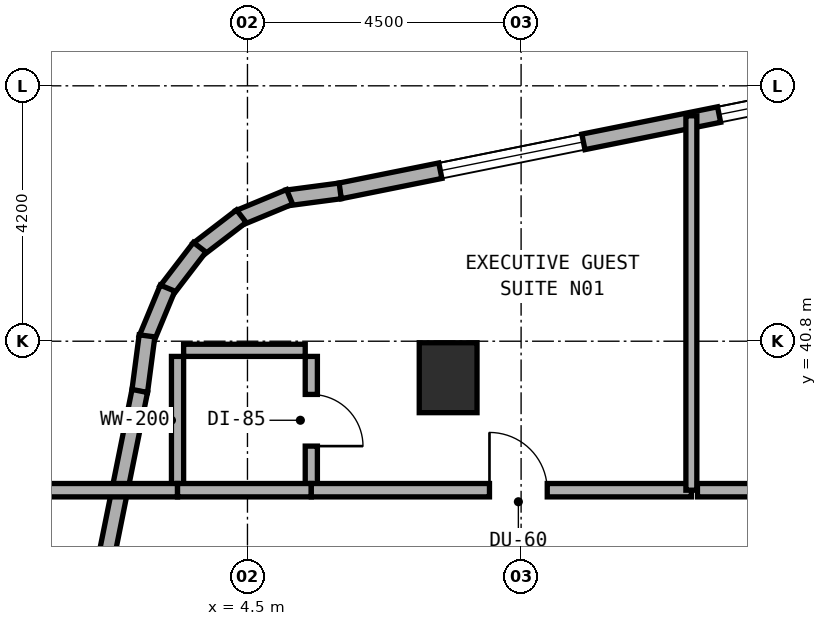
"""IFC4 building model, lengths in metres.
Left out: names, types, materials, properties, quantities, classifications, styles, units other than length and angle.
Written with IfcOpenShell. Run it as: python <this file> out.ifc"""

import sys

from ifc_helpers import new_model, si_unit, direction, frame, frame_2d, origin, origin_2d, place, context, subcontext, project, spatial, rectangle, extrude, element, fill, save


model = new_model("IFC4")
c1 = context("Model", 3, precision=1e-05, world=origin(), true_north=direction((0.0, 1.0)))
c2 = subcontext(c1, "Body", "Model", "MODEL_VIEW")
j1 = project(units=[si_unit("LENGTHUNIT", "METRE"), si_unit("PLANEANGLEUNIT", "RADIAN")], contexts=[c1])
p1 = place(None, origin())
s1 = spatial("IfcSite", under=j1, at=p1, CompositionType="ELEMENT")
p2 = place(p1, origin())
s2 = spatial("IfcBuilding", under=s1, at=p2, CompositionType="ELEMENT")
p3 = place(p2, frame((0.0, 0.0, 112.5)))
s3 = spatial("IfcBuildingStorey", under=s2, at=p3, CompositionType="ELEMENT", Elevation=112.5)
p4 = place(p3, frame((7.8, 40.2, 0.0), z_axis=(0.0, 0.0, 1.0), x_axis=(1.0, 0.0, 0.0)))
e1 = element("IfcColumn", 1, at=p4, inside=s3, PredefinedType="COLUMN", context=c2, shape_type="SweptSolid", body=[
    extrude(rectangle(XDim=0.95, YDim=1.15, at=origin_2d()), origin(), (0.0, 0.0, 1.0), 3.5),
])
p5 = place(p3, frame((14.991, 45.078, 0.0), z_axis=(0.0, 0.0, 1.0), x_axis=(-0.980321298532, -0.197408590603, 0.0)))
e2 = element("IfcWall", 2, at=p5, inside=s3, PredefinedType="STANDARD", context=c2, shape_type="SweptSolid", body=[
    extrude(rectangle(XDim=9.153, YDim=0.26, at=frame_2d((4.577, 0.0))), origin(), (0.0, 0.0, 1.0), 3.22),
])
p6 = place(p5, frame((0.39, 0.0, 0.8)))
e3 = element("IfcOpeningElement", 3, at=p6, cuts=e2, PredefinedType="OPENING", context=c2, shape_type="SweptSolid", body=[
    extrude(rectangle(XDim=2.4, YDim=1.6, at=frame_2d((1.2, 0.8))), frame((0.0, 0.14, 0.0), z_axis=(0.0, -1.0, 0.0), x_axis=(1.0, 0.0, 0.0)), (0.0, 0.0, 1.0), 0.28),
])
p7 = place(p5, frame((5.066, 0.0, 0.8)))
e4 = element("IfcOpeningElement", 4, at=p7, cuts=e2, PredefinedType="OPENING", context=c2, shape_type="SweptSolid", body=[
    extrude(rectangle(XDim=2.4, YDim=1.6, at=frame_2d((1.2, 0.8))), frame((0.0, 0.14, 0.0), z_axis=(0.0, -1.0, 0.0), x_axis=(1.0, 0.0, 0.0)), (0.0, 0.0, 1.0), 0.28),
])
p8 = place(p3, frame((6.025, 43.272, 0.0), z_axis=(0.0, 0.0, 1.0), x_axis=(-0.991388484223, -0.130953706898, 0.0)))
e5 = element("IfcWall", 5, at=p8, inside=s3, PredefinedType="STANDARD", context=c2, shape_type="SweptSolid", body=[
    extrude(rectangle(XDim=0.885, YDim=0.26, at=frame_2d((0.443, 0.0))), origin(), (0.0, 0.0, 1.0), 3.22),
])
p9 = place(p3, frame((5.193, 43.174, 0.0), z_axis=(0.0, 0.0, 1.0), x_axis=(-0.923627776508, -0.383290660547, 0.0)))
e6 = element("IfcWall", 6, at=p9, inside=s3, PredefinedType="STANDARD", context=c2, shape_type="SweptSolid", body=[
    extrude(rectangle(XDim=0.903, YDim=0.26, at=frame_2d((0.452, 0.0))), origin(), (0.0, 0.0, 1.0), 3.22),
])
p10 = place(p3, frame((4.399, 42.856, 0.0), z_axis=(0.0, 0.0, 1.0), x_axis=(-0.793458244748, -0.608624690463, 0.0)))
e7 = element("IfcWall", 7, at=p10, inside=s3, PredefinedType="STANDARD", context=c2, shape_type="SweptSolid", body=[
    extrude(rectangle(XDim=0.902, YDim=0.26, at=frame_2d((0.451, 0.0))), origin(), (0.0, 0.0, 1.0), 3.22),
])
p11 = place(p3, frame((3.714, 42.345, 0.0), z_axis=(0.0, 0.0, 1.0), x_axis=(-0.608494022858, -0.793558456666, 0.0)))
e8 = element("IfcWall", 8, at=p11, inside=s3, PredefinedType="STANDARD", context=c2, shape_type="SweptSolid", body=[
    extrude(rectangle(XDim=0.902, YDim=0.26, at=frame_2d((0.451, 0.0))), origin(), (0.0, 0.0, 1.0), 3.22),
])
p12 = place(p3, frame((3.186, 41.673, 0.0), z_axis=(0.0, 0.0, 1.0), x_axis=(-0.383155708213, -0.923683767999, 0.0)))
e9 = element("IfcWall", 9, at=p12, inside=s3, PredefinedType="STANDARD", context=c2, shape_type="SweptSolid", body=[
    extrude(rectangle(XDim=0.903, YDim=0.26, at=frame_2d((0.451, 0.0))), origin(), (0.0, 0.0, 1.0), 3.22),
])
p13 = place(p3, frame((2.848, 40.888, 0.0), z_axis=(0.0, 0.0, 1.0), x_axis=(-0.130200706103, -0.991487658083, 0.0)))
e10 = element("IfcWall", 10, at=p13, inside=s3, PredefinedType="STANDARD", context=c2, shape_type="SweptSolid", body=[
    extrude(rectangle(XDim=0.921, YDim=0.26, at=frame_2d((0.46, 0.0))), origin(), (0.0, 0.0, 1.0), 3.22),
])
p14 = place(p3, frame((2.729, 39.982, 0.0), z_axis=(0.0, 0.0, 1.0), x_axis=(-0.197435082048, -0.980315963543, 0.0)))
e11 = element("IfcWall", 11, at=p14, inside=s3, PredefinedType="STANDARD", context=c2, shape_type="SweptSolid", body=[
    extrude(rectangle(XDim=9.183, YDim=0.26, at=frame_2d((4.591, 0.0))), origin(), (0.0, 0.0, 1.0), 3.22),
])
p15 = place(p14, frame((4.286, 0.0, 0.8)))
e12 = element("IfcOpeningElement", 12, at=p15, cuts=e11, PredefinedType="OPENING", context=c2, shape_type="SweptSolid", body=[
    extrude(rectangle(XDim=2.4, YDim=1.6, at=frame_2d((1.2, 0.8))), frame((0.0, 0.14, 0.0), z_axis=(0.0, -1.0, 0.0), x_axis=(1.0, 0.0, 0.0)), (0.0, 0.0, 1.0), 0.28),
])
p16 = place(p3, frame((5.55, 38.45, 0.0), z_axis=(0.0, 0.0, 1.0), x_axis=(0.0, 1.0, 0.0)))
e13 = element("IfcWall", 13, at=p16, inside=s3, PredefinedType="PLUMBINGWALL", context=c2, shape_type="SweptSolid", body=[
    extrude(rectangle(XDim=2.1, YDim=0.2, at=frame_2d((1.05, 0.0))), origin(), (0.0, 0.0, 1.0), 3.22),
])
p17 = place(p16, frame((0.625, 0.0, 0.0)))
e14 = element("IfcOpeningElement", 14, at=p17, cuts=e13, PredefinedType="OPENING", context=c2, shape_type="SweptSolid", body=[
    extrude(rectangle(XDim=0.85, YDim=2.1, at=frame_2d((0.425, 1.05))), frame((0.0, 0.11, 0.0), z_axis=(0.0, -1.0, 0.0), x_axis=(1.0, 0.0, 0.0)), (0.0, 0.0, 1.0), 0.22),
])
p18 = place(p3, frame((3.45, 40.65, 0.0), z_axis=(0.0, 0.0, 1.0), x_axis=(1.0, 0.0, 0.0)))
e15 = element("IfcWall", 15, at=p18, inside=s3, PredefinedType="PLUMBINGWALL", context=c2, shape_type="SweptSolid", body=[
    extrude(rectangle(XDim=2.0, YDim=0.2, at=frame_2d((1.0, 0.0))), origin(), (0.0, 0.0, 1.0), 3.22),
])
p19 = place(p3, frame((3.35, 38.45, 0.0), z_axis=(0.0, 0.0, 1.0), x_axis=(0.0, 1.0, 0.0)))
e16 = element("IfcWall", 16, at=p19, inside=s3, PredefinedType="PLUMBINGWALL", context=c2, shape_type="SweptSolid", body=[
    extrude(rectangle(XDim=2.1, YDim=0.2, at=frame_2d((1.05, 0.0))), origin(), (0.0, 0.0, 1.0), 3.22),
])
p20 = place(p3, frame((0.96, 38.35, 0.0), z_axis=(0.0, 0.0, 1.0), x_axis=(1.0, 0.0, 0.0)))
e17 = element("IfcWall", 17, at=p20, inside=s3, PredefinedType="SOLIDWALL", context=c2, shape_type="SweptSolid", body=[
    extrude(rectangle(XDim=2.39, YDim=0.22, at=frame_2d((1.195, 0.0))), origin(), (0.0, 0.0, 1.0), 3.22),
])
p21 = place(p3, frame((3.35, 38.35, 0.0), z_axis=(0.0, 0.0, 1.0), x_axis=(1.0, 0.0, 0.0)))
e18 = element("IfcWall", 18, at=p21, inside=s3, PredefinedType="SOLIDWALL", context=c2, shape_type="SweptSolid", body=[
    extrude(rectangle(XDim=2.2, YDim=0.22, at=frame_2d((1.1, 0.0))), origin(), (0.0, 0.0, 1.0), 3.22),
])
p22 = place(p3, frame((5.55, 38.35, 0.0), z_axis=(0.0, 0.0, 1.0), x_axis=(1.0, 0.0, 0.0)))
e19 = element("IfcWall", 19, at=p22, inside=s3, PredefinedType="SOLIDWALL", context=c2, shape_type="SweptSolid", body=[
    extrude(rectangle(XDim=6.25, YDim=0.22, at=frame_2d((3.125, 0.0))), origin(), (0.0, 0.0, 1.0), 2.695),
])
p23 = place(p22, frame((2.93, 0.0, 0.0)))
e20 = element("IfcOpeningElement", 20, at=p23, cuts=e19, PredefinedType="OPENING", context=c2, shape_type="SweptSolid", body=[
    extrude(rectangle(XDim=0.95, YDim=2.1, at=frame_2d((0.475, 1.05))), frame((0.0, 0.12, 0.0), z_axis=(0.0, -1.0, 0.0), x_axis=(1.0, 0.0, 0.0)), (0.0, 0.0, 1.0), 0.24),
])
p24 = place(p3, frame((11.8, 38.35, 0.0), z_axis=(0.0, 0.0, 1.0), x_axis=(0.0, 1.0, 0.0)))
e21 = element("IfcWall", 21, at=p24, inside=s3, PredefinedType="SOLIDWALL", context=c2, shape_type="SweptSolid", body=[
    extrude(rectangle(XDim=6.157, YDim=0.18, at=frame_2d((3.079, 0.0))), origin(), (0.0, 0.0, 1.0), 2.835),
])
p25 = place(p3, frame((11.9, 38.35, 0.0), z_axis=(0.0, 0.0, 1.0), x_axis=(1.0, 0.0, 0.0)))
e22 = element("IfcWall", 22, at=p25, inside=s3, PredefinedType="SOLIDWALL", context=c2, shape_type="SweptSolid", body=[
    extrude(rectangle(XDim=13.8, YDim=0.22, at=frame_2d((6.9, 0.0))), origin(), (0.0, 0.0, 1.0), 2.695),
])
p26 = place(p25, frame((5.773, 0.0, 0.0)))
e23 = element("IfcOpeningElement", 23, at=p26, cuts=e22, PredefinedType="OPENING", context=c2, shape_type="SweptSolid", body=[
    extrude(rectangle(XDim=0.95, YDim=2.1, at=frame_2d((0.475, 1.05))), frame((0.0, 0.12, 0.0), z_axis=(0.0, -1.0, 0.0), x_axis=(1.0, 0.0, 0.0)), (0.0, 0.0, 1.0), 0.24),
])
p27 = place(p6, origin())
e24 = element("IfcWindow", 24, at=p27, inside=s3, PartitioningType="SINGLE_PANEL", PredefinedType="WINDOW", context=c2, shape_type="SweptSolid", body=[
    extrude(rectangle(XDim=2.4, YDim=1.6, at=frame_2d((1.2, 0.8))), frame((0.0, 0.03, 0.0), z_axis=(0.0, -1.0, 0.0), x_axis=(1.0, 0.0, 0.0)), (0.0, 0.0, 1.0), 0.06),
])
fill(e3, e24)
p28 = place(p7, origin())
e25 = element("IfcWindow", 25, at=p28, inside=s3, PartitioningType="SINGLE_PANEL", PredefinedType="WINDOW", context=c2, shape_type="SweptSolid", body=[
    extrude(rectangle(XDim=2.4, YDim=1.6, at=frame_2d((1.2, 0.8))), frame((0.0, 0.03, 0.0), z_axis=(0.0, -1.0, 0.0), x_axis=(1.0, 0.0, 0.0)), (0.0, 0.0, 1.0), 0.06),
])
fill(e4, e25)
p29 = place(p17, frame((0.85, 0.0, 0.0), z_axis=(0.0, 0.0, 1.0), x_axis=(-1.0, 0.0, 0.0)))
e26 = element("IfcDoor", 26, at=p29, inside=s3, OperationType="SINGLE_SWING_RIGHT", PredefinedType="DOOR", context=c2, shape_type="SweptSolid", body=[
    extrude(rectangle(XDim=0.85, YDim=2.1, at=frame_2d((0.425, 1.05))), frame((0.0, 0.025, 0.0), z_axis=(0.0, -1.0, 0.0), x_axis=(1.0, 0.0, 0.0)), (0.0, 0.0, 1.0), 0.05),
])
fill(e14, e26)
p30 = place(p23, origin())
e27 = element("IfcDoor", 27, at=p30, inside=s3, OperationType="SINGLE_SWING_LEFT", PredefinedType="DOOR", context=c2, shape_type="SweptSolid", body=[
    extrude(rectangle(XDim=0.95, YDim=2.1, at=frame_2d((0.475, 1.05))), frame((0.0, 0.025, 0.0), z_axis=(0.0, -1.0, 0.0), x_axis=(1.0, 0.0, 0.0)), (0.0, 0.0, 1.0), 0.05),
])
fill(e20, e27)
save(model, sys.argv[1])
